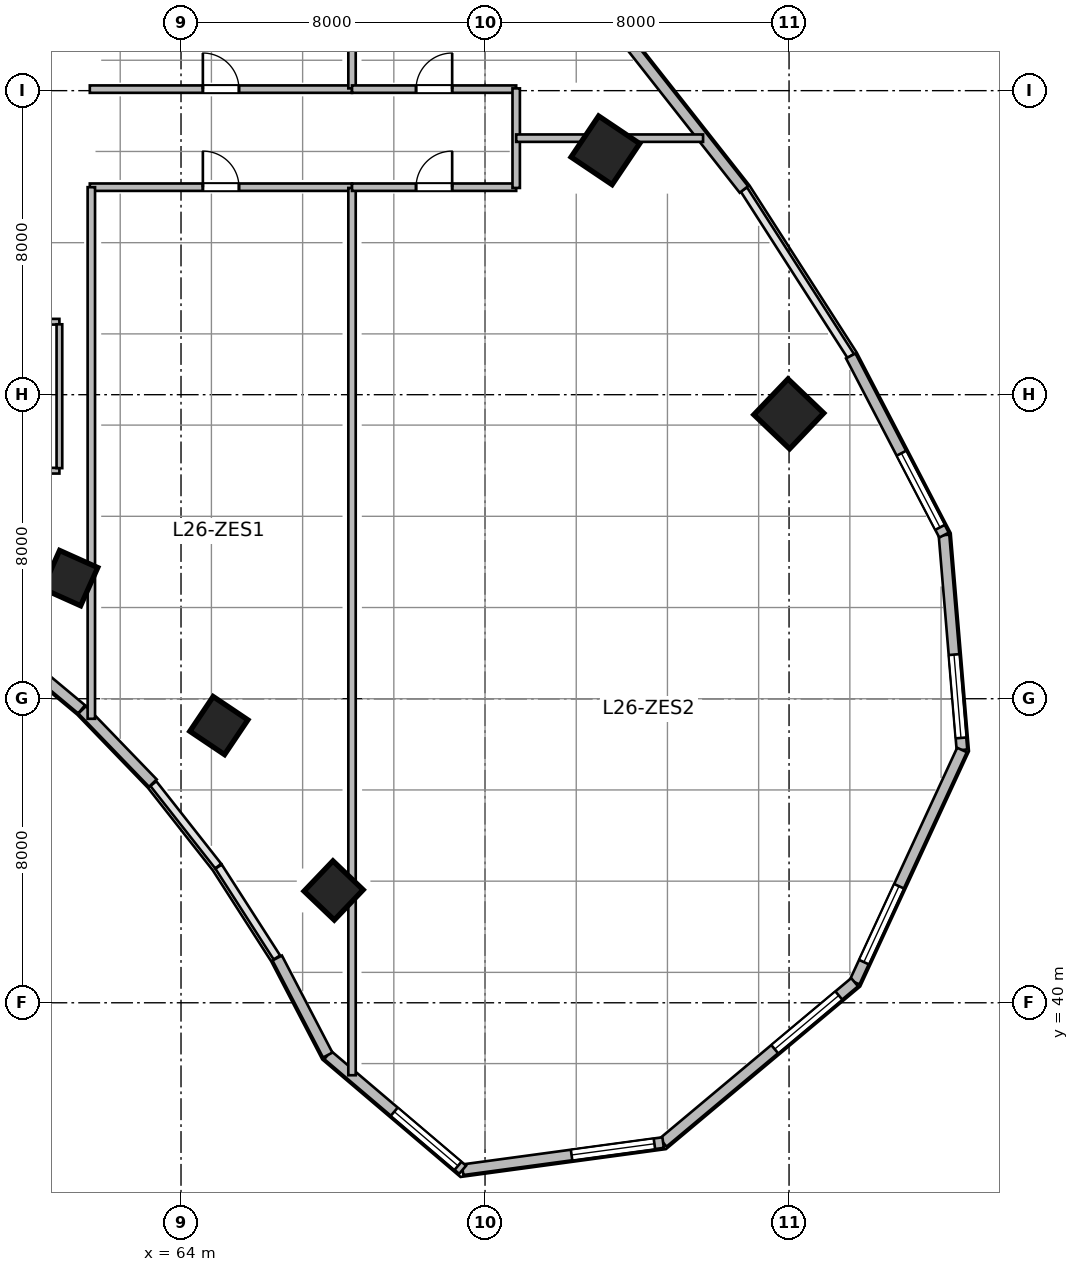
"""IFC4 building model, lengths in metres.
Left out: names, types, materials, properties, quantities, classifications, styles, units other than length and angle.
Written with IfcOpenShell. Run it as: python <this file> out.ifc"""

import sys

from ifc_helpers import new_model, si_unit, direction, frame, frame_2d, origin, origin_2d, place, context, subcontext, project, spatial, rectangle, extrude, source, transform, mapped, element, fill, save


model = new_model("IFC4")
c1 = context("Model", 3, precision=1e-05, world=origin(), true_north=direction((0.0, 1.0)))
c2 = subcontext(c1, "Body", "Model", "MODEL_VIEW")
j1 = project(units=[si_unit("LENGTHUNIT", "METRE"), si_unit("PLANEANGLEUNIT", "RADIAN")], contexts=[c1])
p1 = place(None, origin())
s1 = spatial("IfcSite", under=j1, at=p1, CompositionType="ELEMENT")
p2 = place(p1, origin())
s2 = spatial("IfcBuilding", under=s1, at=p2, CompositionType="ELEMENT")
p3 = place(p2, frame((0.0, 0.0, 111.6)))
s3 = spatial("IfcBuildingStorey", under=s2, at=p3, CompositionType="ELEMENT", Elevation=111.6)
m1 = source(origin(), c2, "Body", "SweptSolid", [
    extrude(rectangle(XDim=1.1, YDim=1.1, at=origin_2d()), origin(), (0.0, 0.0, 1.0), 3.9),
])
for number, where, z_axis, x_axis in (
    (1, (61.082, 51.175, 0.0), (0.0, 0.0, 1.0), (0.409, 0.912, 0.0)),
    (2, (64.996, 47.294, 0.0), (0.0, 0.0, 1.0), (0.558, 0.83, 0.0)),
):
    element("IfcColumn", number, at=place(p3, frame(where, z_axis=z_axis, x_axis=x_axis)), inside=s3, PredefinedType="COLUMN", context=c2, shape_type="MappedRepresentation", body=[
        mapped(m1, transform((0.0, 0.0, 0.0), scale=1.0)),
    ])
m2 = source(origin(), c2, "Body", "SweptSolid", [
    extrude(rectangle(XDim=1.3, YDim=1.3, at=origin_2d()), origin(), (0.0, 0.0, 1.0), 3.9),
])
p4 = place(p3, frame((75.167, 62.43, 0.0), z_axis=(0.0, 0.0, 1.0), x_axis=(0.55774510898, 0.830012285095, 0.0)))
e3 = element("IfcColumn", 3, at=p4, inside=s3, PredefinedType="COLUMN", context=c2, shape_type="MappedRepresentation", body=[
    mapped(m2, transform((0.0, 0.0, 0.0), scale=1.0)),
])
p5 = place(p3, frame((68.015, 42.955, 0.0), z_axis=(0.0, 0.0, 1.0), x_axis=(0.690756218984, 0.723087716626, 0.0)))
e4 = element("IfcColumn", 4, at=p5, inside=s3, PredefinedType="COLUMN", context=c2, shape_type="MappedRepresentation", body=[
    mapped(m1, transform((0.0, 0.0, 0.0), scale=1.0)),
])
p6 = place(p3, frame((79.993, 55.494, 0.0), z_axis=(0.0, 0.0, 1.0), x_axis=(0.690756218984, 0.723087716626, 0.0)))
e5 = element("IfcColumn", 5, at=p6, inside=s3, PredefinedType="COLUMN", context=c2, shape_type="MappedRepresentation", body=[
    mapped(m2, transform((0.0, 0.0, 0.0), scale=1.0)),
])
m3 = source(origin(), c2, "Body", "SweptSolid", [
    extrude(rectangle(XDim=5.674, YDim=0.28, at=frame_2d((2.837, 0.0))), origin(), (0.0, 0.0, 1.0), 3.65),
])
p7 = place(p3, frame((84.078, 52.305, 0.0), z_axis=(0.0, 0.0, 1.0), x_axis=(0.083309007867, -0.996523762491, 0.0)))
e6 = element("IfcWall", 6, at=p7, inside=s3, PredefinedType="SOLIDWALL", context=c2, shape_type="MappedRepresentation", body=[
    mapped(m3, transform((0.0, 0.0, 0.0), scale=1.0)),
])
p8 = place(p7, frame((3.155, 0.0, 0.95)))
e7 = element("IfcOpeningElement", 7, at=p8, cuts=e6, PredefinedType="OPENING", context=c2, shape_type="SweptSolid", body=[
    extrude(rectangle(XDim=2.2, YDim=2.1, at=frame_2d((1.1, 1.05))), frame((0.0, 0.15, 0.0), z_axis=(0.0, -1.0, 0.0), x_axis=(1.0, 0.0, 0.0)), (0.0, 0.0, 1.0), 0.3),
])
m4 = source(origin(), c2, "Body", "SweptSolid", [
    extrude(rectangle(XDim=6.732, YDim=0.28, at=frame_2d((3.366, 0.0))), origin(), (0.0, 0.0, 1.0), 3.65),
])
p9 = place(p3, frame((84.55, 46.652, 0.0), z_axis=(0.0, 0.0, 1.0), x_axis=(-0.419644552709, -0.907688520023, 0.0)))
e8 = element("IfcWall", 8, at=p9, inside=s3, PredefinedType="SOLIDWALL", context=c2, shape_type="MappedRepresentation", body=[
    mapped(m4, transform((0.0, 0.0, 0.0), scale=1.0)),
])
p10 = place(p9, frame((3.949, 0.0, 0.95)))
e9 = element("IfcOpeningElement", 9, at=p10, cuts=e8, PredefinedType="OPENING", context=c2, shape_type="SweptSolid", body=[
    extrude(rectangle(XDim=2.2, YDim=2.1, at=frame_2d((1.1, 1.05))), frame((0.0, 0.15, 0.0), z_axis=(0.0, -1.0, 0.0), x_axis=(1.0, 0.0, 0.0)), (0.0, 0.0, 1.0), 0.3),
])
m5 = source(origin(), c2, "Body", "SweptSolid", [
    extrude(rectangle(XDim=6.573, YDim=0.28, at=frame_2d((3.287, 0.0))), origin(), (0.0, 0.0, 1.0), 3.65),
])
p11 = place(p3, frame((81.725, 40.541, 0.0), z_axis=(0.0, 0.0, 1.0), x_axis=(-0.766715154163, -0.641987439423, 0.0)))
e10 = element("IfcWall", 10, at=p11, inside=s3, PredefinedType="SOLIDWALL", context=c2, shape_type="MappedRepresentation", body=[
    mapped(m5, transform((0.0, 0.0, 0.0), scale=1.0)),
])
p12 = place(p11, frame((0.543, 0.0, 0.95)))
e11 = element("IfcOpeningElement", 11, at=p12, cuts=e10, PredefinedType="OPENING", context=c2, shape_type="SweptSolid", body=[
    extrude(rectangle(XDim=2.2, YDim=2.1, at=frame_2d((1.1, 1.05))), frame((0.0, 0.15, 0.0), z_axis=(0.0, -1.0, 0.0), x_axis=(1.0, 0.0, 0.0)), (0.0, 0.0, 1.0), 0.3),
])
m6 = source(origin(), c2, "Body", "SweptSolid", [
    extrude(rectangle(XDim=5.324, YDim=0.28, at=frame_2d((2.662, 0.0))), origin(), (0.0, 0.0, 1.0), 3.65),
])
p13 = place(p3, frame((76.686, 36.322, 0.0), z_axis=(0.0, 0.0, 1.0), x_axis=(-0.990931467223, -0.134368252451, 0.0)))
e12 = element("IfcWall", 12, at=p13, inside=s3, PredefinedType="SOLIDWALL", context=c2, shape_type="MappedRepresentation", body=[
    mapped(m6, transform((0.0, 0.0, 0.0), scale=1.0)),
])
p14 = place(p13, frame((0.231, 0.0, 0.95)))
e13 = element("IfcOpeningElement", 13, at=p14, cuts=e12, PredefinedType="OPENING", context=c2, shape_type="SweptSolid", body=[
    extrude(rectangle(XDim=2.2, YDim=2.1, at=frame_2d((1.1, 1.05))), frame((0.0, 0.15, 0.0), z_axis=(0.0, -1.0, 0.0), x_axis=(1.0, 0.0, 0.0)), (0.0, 0.0, 1.0), 0.3),
])
m7 = source(origin(), c2, "Body", "SweptSolid", [
    extrude(rectangle(XDim=4.659, YDim=0.28, at=frame_2d((2.33, 0.0))), origin(), (0.0, 0.0, 1.0), 3.65),
])
p15 = place(p3, frame((71.41, 35.606, 0.0), z_axis=(0.0, 0.0, 1.0), x_axis=(-0.761913458795, 0.647678841176, 0.0)))
e14 = element("IfcWall", 14, at=p15, inside=s3, PredefinedType="SOLIDWALL", context=c2, shape_type="MappedRepresentation", body=[
    mapped(m7, transform((0.0, 0.0, 0.0), scale=1.0)),
])
p16 = place(p15, frame((0.16, 0.0, 0.95)))
e15 = element("IfcOpeningElement", 15, at=p16, cuts=e14, PredefinedType="OPENING", context=c2, shape_type="SweptSolid", body=[
    extrude(rectangle(XDim=2.2, YDim=2.1, at=frame_2d((1.1, 1.05))), frame((0.0, 0.15, 0.0), z_axis=(0.0, -1.0, 0.0), x_axis=(1.0, 0.0, 0.0)), (0.0, 0.0, 1.0), 0.3),
])
m8 = source(origin(), c2, "Body", "SweptSolid", [
    extrude(rectangle(XDim=2.88, YDim=0.28, at=frame_2d((1.44, 0.0))), origin(), (0.0, 0.0, 1.0), 3.65),
])
p17 = place(p3, frame((67.861, 38.624, 0.0), z_axis=(0.0, 0.0, 1.0), x_axis=(-0.461769086658, 0.887000175088, 0.0)))
e16 = element("IfcWall", 16, at=p17, inside=s3, PredefinedType="SOLIDWALL", context=c2, shape_type="MappedRepresentation", body=[
    mapped(m8, transform((0.0, 0.0, 0.0), scale=1.0)),
])
m9 = source(origin(), c2, "Body", "SweptSolid", [
    extrude(rectangle(XDim=2.68, YDim=0.28, at=frame_2d((1.34, 0.0))), origin(), (0.0, 0.0, 1.0), 3.65),
])
p18 = place(p3, frame((63.26, 45.78, 0.0), z_axis=(0.0, 0.0, 1.0), x_axis=(-0.694561996568, 0.719432855049, 0.0)))
e17 = element("IfcWall", 17, at=p18, inside=s3, PredefinedType="SOLIDWALL", context=c2, shape_type="MappedRepresentation", body=[
    mapped(m9, transform((0.0, 0.0, 0.0), scale=1.0)),
])
m10 = source(origin(), c2, "Body", "SweptSolid", [
    extrude(rectangle(XDim=2.601, YDim=0.28, at=frame_2d((1.3, 0.0))), origin(), (0.0, 0.0, 1.0), 3.65),
])
p19 = place(p3, frame((61.385, 47.721, 0.0), z_axis=(0.0, 0.0, 1.0), x_axis=(-0.76796730295, 0.640489048775, 0.0)))
e18 = element("IfcWall", 18, at=p19, inside=s3, PredefinedType="SOLIDWALL", context=c2, shape_type="MappedRepresentation", body=[
    mapped(m10, transform((0.0, 0.0, 0.0), scale=1.0)),
])
m11 = source(origin(), c2, "Body", "SweptSolid", [
    extrude(rectangle(XDim=5.058, YDim=0.28, at=frame_2d((2.529, 0.0))), origin(), (0.0, 0.0, 1.0), 3.65),
])
p20 = place(p3, frame((75.685, 65.376, 0.0), z_axis=(0.0, 0.0, 1.0), x_axis=(0.618145507434, -0.786063694391, 0.0)))
e19 = element("IfcWall", 19, at=p20, inside=s3, PredefinedType="SOLIDWALL", context=c2, shape_type="MappedRepresentation", body=[
    mapped(m11, transform((0.0, 0.0, 0.0), scale=1.0)),
])
m12 = source(origin(), c2, "Body", "SweptSolid", [
    extrude(rectangle(XDim=5.315, YDim=0.28, at=frame_2d((2.658, 0.0))), origin(), (0.0, 0.0, 1.0), 3.65),
])
p21 = place(p3, frame((81.623, 57.02, 0.0), z_axis=(0.0, 0.0, 1.0), x_axis=(0.461760527822, -0.887004630735, 0.0)))
e20 = element("IfcWall", 20, at=p21, inside=s3, PredefinedType="SOLIDWALL", context=c2, shape_type="MappedRepresentation", body=[
    mapped(m12, transform((0.0, 0.0, 0.0), scale=1.0)),
])
p22 = place(p21, frame((2.886, 0.0, 0.95)))
e21 = element("IfcOpeningElement", 21, at=p22, cuts=e20, PredefinedType="OPENING", context=c2, shape_type="SweptSolid", body=[
    extrude(rectangle(XDim=2.2, YDim=2.1, at=frame_2d((1.1, 1.05))), frame((0.0, 0.15, 0.0), z_axis=(0.0, -1.0, 0.0), x_axis=(1.0, 0.0, 0.0)), (0.0, 0.0, 1.0), 0.3),
])
m13 = source(origin(), c2, "Body", "SweptSolid", [
    extrude(rectangle(XDim=6.6, YDim=0.15, at=frame_2d((3.3, 0.0))), origin(), (0.0, 0.0, 1.0), 3.095),
])
p23 = place(p3, frame((54.2, 54.0, 0.0), z_axis=(0.0, 0.0, 1.0), x_axis=(1.0, 0.0, 0.0)))
e22 = element("IfcWall", 22, at=p23, inside=s3, PredefinedType="PARTITIONING", context=c2, shape_type="MappedRepresentation", body=[
    mapped(m13, transform((0.0, 0.0, 0.0), scale=1.0)),
])
m14 = source(origin(), c2, "Body", "SweptSolid", [
    extrude(rectangle(XDim=6.6, YDim=0.15, at=frame_2d((3.3, 0.0))), origin(), (0.0, 0.0, 1.0), 3.65),
])
p24 = place(p3, frame((54.2, 57.92, 0.0), z_axis=(0.0, 0.0, 1.0), x_axis=(1.0, 0.0, 0.0)))
e23 = element("IfcWall", 23, at=p24, inside=s3, PredefinedType="PARTITIONING", context=c2, shape_type="MappedRepresentation", body=[
    mapped(m14, transform((0.0, 0.0, 0.0), scale=1.0)),
])
p25 = place(p24, frame((2.825, 0.0, 0.0)))
e24 = element("IfcOpeningElement", 24, at=p25, cuts=e23, PredefinedType="OPENING", context=c2, shape_type="SweptSolid", body=[
    extrude(rectangle(XDim=0.95, YDim=2.1, at=frame_2d((0.475, 1.05))), frame((0.0, 0.085, 0.0), z_axis=(0.0, -1.0, 0.0), x_axis=(1.0, 0.0, 0.0)), (0.0, 0.0, 1.0), 0.17),
])
m15 = source(origin(), c2, "Body", "SweptSolid", [
    extrude(rectangle(XDim=3.785, YDim=0.15, at=frame_2d((1.893, 0.0))), origin(), (0.0, 0.0, 1.0), 3.65),
])
p26 = place(p3, frame((60.8, 54.067, 0.0), z_axis=(0.0, 0.0, 1.0), x_axis=(0.0, 1.0, 0.0)))
e25 = element("IfcWall", 25, at=p26, inside=s3, PredefinedType="PARTITIONING", context=c2, shape_type="MappedRepresentation", body=[
    mapped(m15, transform((0.0, 0.0, 0.0), scale=1.0)),
])
m16 = source(origin(), c2, "Body", "SweptSolid", [
    extrude(rectangle(XDim=6.9, YDim=0.195, at=frame_2d((3.45, 0.0))), origin(), (0.0, 0.0, 1.0), 3.65),
])
p27 = place(p3, frame((61.6, 64.04, 0.0), z_axis=(0.0, 0.0, 1.0), x_axis=(1.0, 0.0, 0.0)))
e26 = element("IfcWall", 26, at=p27, inside=s3, PredefinedType="PARTITIONING", context=c2, shape_type="MappedRepresentation", body=[
    mapped(m16, transform((0.0, 0.0, 0.0), scale=1.0)),
])
p28 = place(p27, frame((2.975, 0.0, 0.0)))
e27 = element("IfcOpeningElement", 27, at=p28, cuts=e26, PredefinedType="OPENING", context=c2, shape_type="SweptSolid", body=[
    extrude(rectangle(XDim=0.95, YDim=2.1, at=frame_2d((0.475, 1.05))), frame((0.0, 0.107, 0.0), z_axis=(0.0, -1.0, 0.0), x_axis=(1.0, 0.0, 0.0)), (0.0, 0.0, 1.0), 0.215),
])
m17 = source(origin(), c2, "Body", "SweptSolid", [
    extrude(rectangle(XDim=7.963, YDim=0.195, at=frame_2d((3.982, 0.0))), origin(), (0.0, 0.0, 1.0), 2.942),
])
p29 = place(p3, frame((68.5, 64.06, 0.0), z_axis=(0.0, 0.0, 1.0), x_axis=(0.0, 1.0, 0.0)))
e28 = element("IfcWall", 28, at=p29, inside=s3, PredefinedType="PARTITIONING", context=c2, shape_type="MappedRepresentation", body=[
    mapped(m17, transform((0.0, 0.0, 0.0), scale=1.0)),
])
m18 = source(origin(), c2, "Body", "SweptSolid", [
    extrude(rectangle(XDim=4.32, YDim=0.195, at=frame_2d((2.16, 0.0))), origin(), (0.0, 0.0, 1.0), 3.65),
])
p30 = place(p3, frame((68.5, 64.04, 0.0), z_axis=(0.0, 0.0, 1.0), x_axis=(1.0, 0.0, 0.0)))
e29 = element("IfcWall", 29, at=p30, inside=s3, PredefinedType="PARTITIONING", context=c2, shape_type="MappedRepresentation", body=[
    mapped(m18, transform((0.0, 0.0, 0.0), scale=1.0)),
])
p31 = place(p30, frame((1.685, 0.0, 0.0)))
e30 = element("IfcOpeningElement", 30, at=p31, cuts=e29, PredefinedType="OPENING", context=c2, shape_type="SweptSolid", body=[
    extrude(rectangle(XDim=0.95, YDim=2.1, at=frame_2d((0.475, 1.05))), frame((0.0, 0.107, 0.0), z_axis=(0.0, -1.0, 0.0), x_axis=(1.0, 0.0, 0.0)), (0.0, 0.0, 1.0), 0.215),
])
p32 = place(p3, frame((61.6, 61.46, 0.0), z_axis=(0.0, 0.0, 1.0), x_axis=(1.0, 0.0, 0.0)))
e31 = element("IfcWall", 31, at=p32, inside=s3, PredefinedType="PARTITIONING", context=c2, shape_type="MappedRepresentation", body=[
    mapped(m16, transform((0.0, 0.0, 0.0), scale=1.0)),
])
p33 = place(p32, frame((2.975, 0.0, 0.0)))
e32 = element("IfcOpeningElement", 32, at=p33, cuts=e31, PredefinedType="OPENING", context=c2, shape_type="SweptSolid", body=[
    extrude(rectangle(XDim=0.95, YDim=2.1, at=frame_2d((0.475, 1.05))), frame((0.0, 0.107, 0.0), z_axis=(0.0, -1.0, 0.0), x_axis=(1.0, 0.0, 0.0)), (0.0, 0.0, 1.0), 0.215),
])
m19 = source(origin(), c2, "Body", "SweptSolid", [
    extrude(rectangle(XDim=23.346, YDim=0.195, at=frame_2d((11.673, 0.0))), origin(), (0.0, 0.0, 1.0), 2.942),
])
p34 = place(p3, frame((68.5, 38.094, 0.0), z_axis=(0.0, 0.0, 1.0), x_axis=(0.0, 1.0, 0.0)))
e33 = element("IfcWall", 33, at=p34, inside=s3, PredefinedType="PARTITIONING", context=c2, shape_type="MappedRepresentation", body=[
    mapped(m19, transform((0.0, 0.0, 0.0), scale=1.0)),
])
p35 = place(p3, frame((68.5, 61.46, 0.0), z_axis=(0.0, 0.0, 1.0), x_axis=(1.0, 0.0, 0.0)))
e34 = element("IfcWall", 34, at=p35, inside=s3, PredefinedType="PARTITIONING", context=c2, shape_type="MappedRepresentation", body=[
    mapped(m18, transform((0.0, 0.0, 0.0), scale=1.0)),
])
p36 = place(p35, frame((1.685, 0.0, 0.0)))
e35 = element("IfcOpeningElement", 35, at=p36, cuts=e34, PredefinedType="OPENING", context=c2, shape_type="SweptSolid", body=[
    extrude(rectangle(XDim=0.95, YDim=2.1, at=frame_2d((0.475, 1.05))), frame((0.0, 0.107, 0.0), z_axis=(0.0, -1.0, 0.0), x_axis=(1.0, 0.0, 0.0)), (0.0, 0.0, 1.0), 0.215),
])
m20 = source(origin(), c2, "Body", "SweptSolid", [
    extrude(rectangle(XDim=13.988, YDim=0.195, at=frame_2d((6.994, 0.0))), origin(), (0.0, 0.0, 1.0), 2.942),
])
p37 = place(p3, frame((61.64, 47.472, 0.0), z_axis=(0.0, 0.0, 1.0), x_axis=(0.0, 1.0, 0.0)))
e36 = element("IfcWall", 36, at=p37, inside=s3, PredefinedType="PARTITIONING", context=c2, shape_type="MappedRepresentation", body=[
    mapped(m20, transform((0.0, 0.0, 0.0), scale=1.0)),
])
m21 = source(origin(), c2, "Body", "SweptSolid", [
    extrude(rectangle(XDim=2.62, YDim=0.195, at=frame_2d((1.31, 0.0))), origin(), (0.0, 0.0, 1.0), 3.324),
])
p38 = place(p3, frame((72.82, 61.44, 0.0), z_axis=(0.0, 0.0, 1.0), x_axis=(0.0, 1.0, 0.0)))
e37 = element("IfcWall", 37, at=p38, inside=s3, PredefinedType="PARTITIONING", context=c2, shape_type="MappedRepresentation", body=[
    mapped(m21, transform((0.0, 0.0, 0.0), scale=1.0)),
])
m22 = source(origin(), c2, "Body", "SweptSolid", [
    extrude(rectangle(XDim=4.917, YDim=0.195, at=frame_2d((2.459, 0.0))), origin(), (0.0, 0.0, 1.0), 3.65),
])
p39 = place(p3, frame((72.82, 62.75, 0.0), z_axis=(0.0, 0.0, 1.0), x_axis=(1.0, 0.0, 0.0)))
e38 = element("IfcWall", 38, at=p39, inside=s3, PredefinedType="PARTITIONING", context=c2, shape_type="MappedRepresentation", body=[
    mapped(m22, transform((0.0, 0.0, 0.0), scale=1.0)),
])
m23 = source(origin(), c2, "Body", "SweptSolid", [
    extrude(rectangle(XDim=2.2, YDim=2.1, at=frame_2d((1.1, 1.05))), frame((0.0, 0.03, 0.0), z_axis=(0.0, -1.0, 0.0), x_axis=(1.0, 0.0, 0.0)), (0.0, 0.0, 1.0), 0.06),
])
p40 = place(p8, origin())
e39 = element("IfcWindow", 39, at=p40, inside=s3, PartitioningType="TRIPLE_PANEL_VERTICAL", PredefinedType="WINDOW", context=c2, shape_type="MappedRepresentation", body=[
    mapped(m23, transform((0.0, 0.0, 0.0), scale=1.0)),
])
fill(e7, e39)
p41 = place(p10, origin())
e40 = element("IfcWindow", 40, at=p41, inside=s3, PartitioningType="TRIPLE_PANEL_VERTICAL", PredefinedType="WINDOW", context=c2, shape_type="MappedRepresentation", body=[
    mapped(m23, transform((0.0, 0.0, 0.0), scale=1.0)),
])
fill(e9, e40)
p42 = place(p12, origin())
e41 = element("IfcWindow", 41, at=p42, inside=s3, PartitioningType="TRIPLE_PANEL_VERTICAL", PredefinedType="WINDOW", context=c2, shape_type="MappedRepresentation", body=[
    mapped(m23, transform((0.0, 0.0, 0.0), scale=1.0)),
])
fill(e11, e41)
p43 = place(p14, origin())
e42 = element("IfcWindow", 42, at=p43, inside=s3, PartitioningType="TRIPLE_PANEL_VERTICAL", PredefinedType="WINDOW", context=c2, shape_type="MappedRepresentation", body=[
    mapped(m23, transform((0.0, 0.0, 0.0), scale=1.0)),
])
fill(e13, e42)
p44 = place(p16, origin())
e43 = element("IfcWindow", 43, at=p44, inside=s3, PartitioningType="TRIPLE_PANEL_VERTICAL", PredefinedType="WINDOW", context=c2, shape_type="MappedRepresentation", body=[
    mapped(m23, transform((0.0, 0.0, 0.0), scale=1.0)),
])
fill(e15, e43)
p45 = place(p22, origin())
e44 = element("IfcWindow", 44, at=p45, inside=s3, PartitioningType="TRIPLE_PANEL_VERTICAL", PredefinedType="WINDOW", context=c2, shape_type="MappedRepresentation", body=[
    mapped(m23, transform((0.0, 0.0, 0.0), scale=1.0)),
])
fill(e21, e44)
m24 = source(origin(), c2, "Body", "SweptSolid", [
    extrude(rectangle(XDim=0.95, YDim=2.1, at=frame_2d((0.475, 1.05))), frame((0.0, 0.025, 0.0), z_axis=(0.0, -1.0, 0.0), x_axis=(1.0, 0.0, 0.0)), (0.0, 0.0, 1.0), 0.05),
])
p46 = place(p28, origin())
e45 = element("IfcDoor", 45, at=p46, inside=s3, OperationType="SINGLE_SWING_LEFT", PredefinedType="DOOR", context=c2, shape_type="MappedRepresentation", body=[
    mapped(m24, transform((0.0, 0.0, 0.0), scale=1.0)),
])
fill(e27, e45)
p47 = place(p31, origin())
e46 = element("IfcDoor", 46, at=p47, inside=s3, OperationType="SINGLE_SWING_RIGHT", PredefinedType="DOOR", context=c2, shape_type="MappedRepresentation", body=[
    mapped(m24, transform((0.0, 0.0, 0.0), scale=1.0)),
])
fill(e30, e46)
p48 = place(p33, origin())
e47 = element("IfcDoor", 47, at=p48, inside=s3, OperationType="SINGLE_SWING_LEFT", PredefinedType="DOOR", context=c2, shape_type="MappedRepresentation", body=[
    mapped(m24, transform((0.0, 0.0, 0.0), scale=1.0)),
])
fill(e32, e47)
p49 = place(p36, origin())
e48 = element("IfcDoor", 48, at=p49, inside=s3, OperationType="SINGLE_SWING_RIGHT", PredefinedType="DOOR", context=c2, shape_type="MappedRepresentation", body=[
    mapped(m24, transform((0.0, 0.0, 0.0), scale=1.0)),
])
fill(e35, e48)
save(model, sys.argv[1])
